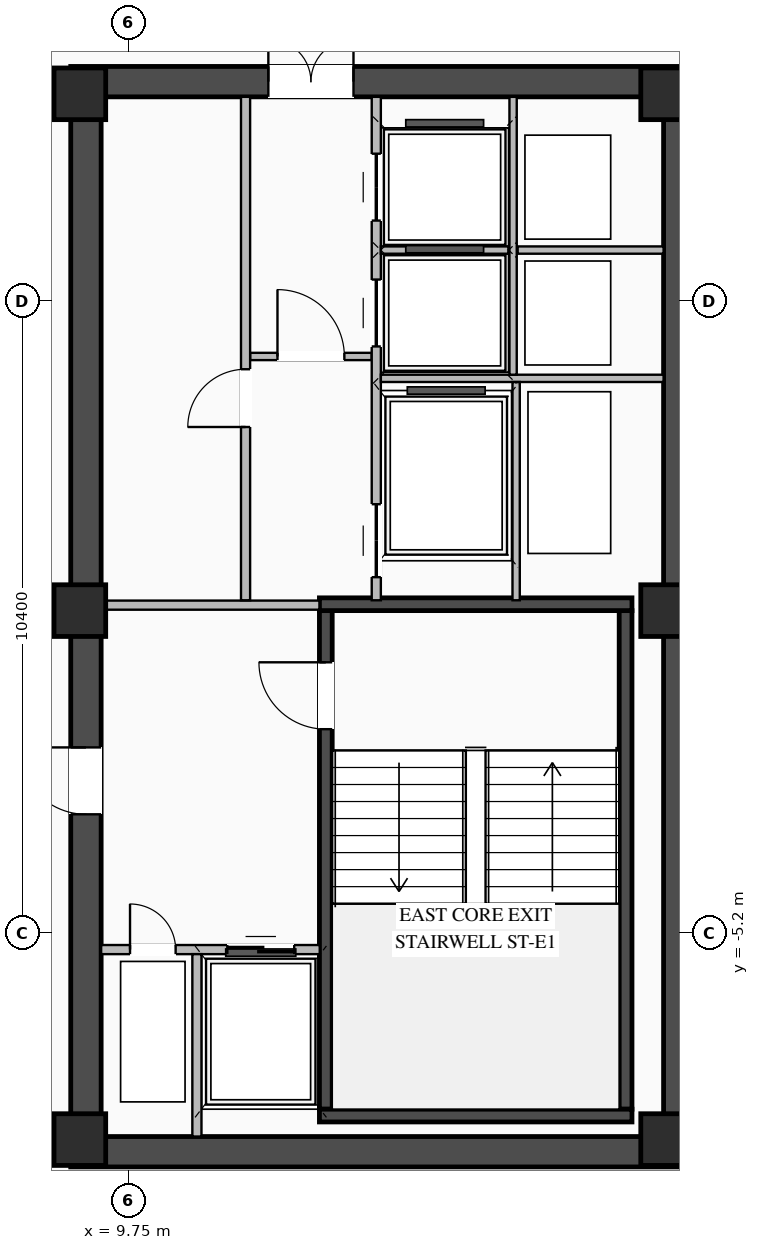
"""IFC4 building model, lengths in metres.
Left out: names, types, materials, properties, quantities, classifications, styles, units other than length and angle.
Written with IfcOpenShell. Run it as: python <this file> out.ifc"""

import sys

from ifc_helpers import new_model, si_unit, direction, frame, frame_2d, origin, origin_2d, place, context, subcontext, project, spatial, rectangle, extrude, element, fill, save


model = new_model("IFC4")
c1 = context("Model", 3, precision=1e-05, world=origin(), true_north=direction((0.0, 1.0)))
c2 = subcontext(c1, "Body", "Model", "MODEL_VIEW")
j1 = project(units=[si_unit("LENGTHUNIT", "METRE"), si_unit("PLANEANGLEUNIT", "RADIAN")], contexts=[c1])
p1 = place(None, origin())
s1 = spatial("IfcSite", under=j1, at=p1, CompositionType="ELEMENT")
p2 = place(p1, origin())
s2 = spatial("IfcBuilding", under=s1, at=p2, CompositionType="ELEMENT")
p3 = place(p2, frame((0.0, 0.0, 236.1)))
s3 = spatial("IfcBuildingStorey", under=s2, at=p3, CompositionType="ELEMENT", Elevation=236.1)
p4 = place(p3, frame((8.8, -8.8, 0.0), z_axis=(0.0, 0.0, 1.0), x_axis=(1.0, 0.0, 0.0)))
e1 = element("IfcWall", 1, at=p4, inside=s3, PredefinedType="SHEAR", context=c2, shape_type="SweptSolid", body=[
    extrude(rectangle(XDim=10.25, YDim=0.5, at=frame_2d((5.125, 0.0))), origin(), (0.0, 0.0, 1.0), 3.27),
])
p5 = place(p3, frame((8.8, 8.8, 0.0), z_axis=(0.0, 0.0, 1.0), x_axis=(1.0, 0.0, 0.0)))
e2 = element("IfcWall", 2, at=p5, inside=s3, PredefinedType="SHEAR", context=c2, shape_type="SweptSolid", body=[
    extrude(rectangle(XDim=10.25, YDim=0.5, at=frame_2d((5.125, 0.0))), origin(), (0.0, 0.0, 1.0), 3.27),
])
p6 = place(p5, frame((3.25, 0.0, 0.0)))
e3 = element("IfcOpeningElement", 3, at=p6, cuts=e2, PredefinedType="OPENING", context=c2, shape_type="SweptSolid", body=[
    extrude(rectangle(XDim=1.4, YDim=2.05, at=frame_2d((0.7, 1.025))), frame((0.0, 0.26, 0.0), z_axis=(0.0, -1.0, 0.0), x_axis=(1.0, 0.0, 0.0)), (0.0, 0.0, 1.0), 0.52),
])
p7 = place(p3, frame((9.05, -8.55, 0.0), z_axis=(0.0, 0.0, 1.0), x_axis=(0.0, 1.0, 0.0)))
e4 = element("IfcWall", 4, at=p7, inside=s3, PredefinedType="SHEAR", context=c2, shape_type="SweptSolid", body=[
    extrude(rectangle(XDim=17.1, YDim=0.5, at=frame_2d((8.55, 0.0))), origin(), (0.0, 0.0, 1.0), 3.27),
])
p8 = place(p7, frame((5.3, 0.0, 0.0)))
e5 = element("IfcOpeningElement", 5, at=p8, cuts=e4, PredefinedType="OPENING", context=c2, shape_type="SweptSolid", body=[
    extrude(rectangle(XDim=1.1, YDim=2.08, at=frame_2d((0.55, 1.04))), frame((0.0, 0.26, 0.0), z_axis=(0.0, -1.0, 0.0), x_axis=(1.0, 0.0, 0.0)), (0.0, 0.0, 1.0), 0.52),
])
p9 = place(p3, frame((18.8, -8.55, 0.0), z_axis=(0.0, 0.0, 1.0), x_axis=(0.0, 1.0, 0.0)))
e6 = element("IfcWall", 6, at=p9, inside=s3, PredefinedType="SHEAR", context=c2, shape_type="SweptSolid", body=[
    extrude(rectangle(XDim=17.1, YDim=0.5, at=frame_2d((8.55, 0.0))), origin(), (0.0, 0.0, 1.0), 3.27),
])
p10 = place(p3, frame((12.995, -8.1, 0.0), z_axis=(0.0, 0.0, 1.0), x_axis=(0.0, 1.0, 0.0)))
e7 = element("IfcWall", 7, at=p10, inside=s3, PredefinedType="SHEAR", context=c2, shape_type="SweptSolid", body=[
    extrude(rectangle(XDim=8.2, YDim=0.21, at=frame_2d((4.1, 0.0))), origin(), (0.0, 0.0, 1.0), 3.27),
])
p11 = place(p10, frame((6.25, 0.0, 0.0)))
e8 = element("IfcOpeningElement", 8, at=p11, cuts=e7, PredefinedType="OPENING", context=c2, shape_type="SweptSolid", body=[
    extrude(rectangle(XDim=1.1, YDim=2.15, at=frame_2d((0.55, 1.075))), frame((0.0, 0.115, 0.0), z_axis=(0.0, -1.0, 0.0), x_axis=(1.0, 0.0, 0.0)), (0.0, 0.0, 1.0), 0.23),
])
p12 = place(p3, frame((17.925, -8.1, 0.0), z_axis=(0.0, 0.0, 1.0), x_axis=(0.0, 1.0, 0.0)))
e9 = element("IfcWall", 9, at=p12, inside=s3, PredefinedType="SHEAR", context=c2, shape_type="SweptSolid", body=[
    extrude(rectangle(XDim=8.2, YDim=0.21, at=frame_2d((4.1, 0.0))), origin(), (0.0, 0.0, 1.0), 3.27),
])
for number, where, z_axis, x_axis in (
    (10, (12.89, -8.205, 0.0), (0.0, 0.0, 1.0), (1.0, 0.0, 0.0)),
    (11, (18.03, 0.205, 0.0), (0.0, 0.0, 1.0), (-1.0, 0.0, 0.0)),
):
    element("IfcWall", number, at=place(p3, frame(where, z_axis=z_axis, x_axis=x_axis)), inside=s3, PredefinedType="SHEAR", context=c2, shape_type="SweptSolid", body=[
        extrude(rectangle(XDim=5.14, YDim=0.21, at=frame_2d((2.57, 0.0))), origin(), (0.0, 0.0, 1.0), 3.27),
    ])
for number, where, z_axis, x_axis in (
    (12, (8.95, -8.6, 0.0), (0.0, 0.0, 1.0), (1.0, 0.0, 0.0)),
    (13, (8.95, 0.1, 0.0), (0.0, 0.0, 1.0), (1.0, 0.0, 0.0)),
    (14, (8.95, 8.6, 0.0), (0.0, 0.0, 1.0), (1.0, 0.0, 0.0)),
    (15, (18.6, -8.6, 0.0), (0.0, 0.0, 1.0), (1.0, 0.0, 0.0)),
    (16, (18.6, 0.1, 0.0), (0.0, 0.0, 1.0), (1.0, 0.0, 0.0)),
    (17, (18.6, 8.6, 0.0), (0.0, 0.0, 1.0), (1.0, 0.0, 0.0)),
):
    element("IfcColumn", number, at=place(p3, frame(where, z_axis=z_axis, x_axis=x_axis)), inside=s3, PredefinedType="COLUMN", context=c2, shape_type="SweptSolid", body=[
        extrude(rectangle(XDim=0.85, YDim=0.85, at=origin_2d()), origin(), (0.0, 0.0, 1.0), 3.45),
    ])
p13 = place(p3, frame((9.3, -5.475, 0.0), z_axis=(0.0, 0.0, 1.0), x_axis=(1.0, 0.0, 0.0)))
e18 = element("IfcWall", 18, at=p13, inside=s3, PredefinedType="STANDARD", context=c2, shape_type="SweptSolid", body=[
    extrude(rectangle(XDim=3.595, YDim=0.15, at=frame_2d((1.797, 0.0))), origin(), (0.0, 0.0, 1.0), 3.25),
])
p14 = place(p13, frame((2.075, 0.0, 0.0)))
e19 = element("IfcOpeningElement", 19, at=p14, cuts=e18, PredefinedType="OPENING", context=c2, shape_type="SweptSolid", body=[
    extrude(rectangle(XDim=1.1, YDim=2.15, at=frame_2d((0.55, 1.075))), frame((0.0, 0.085, 0.0), z_axis=(0.0, -1.0, 0.0), x_axis=(1.0, 0.0, 0.0)), (0.0, 0.0, 1.0), 0.17),
])
p15 = place(p13, frame((0.475, 0.0, 0.0)))
e20 = element("IfcOpeningElement", 20, at=p15, cuts=e18, PredefinedType="OPENING", context=c2, shape_type="SweptSolid", body=[
    extrude(rectangle(XDim=0.75, YDim=2.05, at=frame_2d((0.375, 1.025))), frame((0.0, 0.085, 0.0), z_axis=(0.0, -1.0, 0.0), x_axis=(1.0, 0.0, 0.0)), (0.0, 0.0, 1.0), 0.17),
])
p16 = place(p3, frame((10.875, -8.55, 0.0), z_axis=(0.0, 0.0, 1.0), x_axis=(0.0, 1.0, 0.0)))
e21 = element("IfcWall", 21, at=p16, inside=s3, PredefinedType="STANDARD", context=c2, shape_type="SweptSolid", body=[
    extrude(rectangle(XDim=3.0, YDim=0.15, at=frame_2d((1.5, 0.0))), origin(), (0.0, 0.0, 1.0), 3.25),
])
p17 = place(p3, frame((9.3, 0.19, 0.0), z_axis=(0.0, 0.0, 1.0), x_axis=(1.0, 0.0, 0.0)))
e22 = element("IfcWall", 22, at=p17, inside=s3, PredefinedType="STANDARD", context=c2, shape_type="SweptSolid", body=[
    extrude(rectangle(XDim=3.59, YDim=0.15, at=frame_2d((1.795, 0.0))), origin(), (0.0, 0.0, 1.0), 2.645),
])
p18 = place(p3, frame((11.75, 4.28, 0.0), z_axis=(0.0, 0.0, 1.0), x_axis=(1.0, 0.0, 0.0)))
e23 = element("IfcWall", 23, at=p18, inside=s3, PredefinedType="STANDARD", context=c2, shape_type="SweptSolid", body=[
    extrude(rectangle(XDim=2.0, YDim=0.12, at=frame_2d((1.0, 0.0))), origin(), (0.0, 0.0, 1.0), 3.25),
])
p19 = place(p18, frame((0.45, 0.0, 0.0)))
e24 = element("IfcOpeningElement", 24, at=p19, cuts=e23, PredefinedType="OPENING", context=c2, shape_type="SweptSolid", body=[
    extrude(rectangle(XDim=1.1, YDim=2.1, at=frame_2d((0.55, 1.05))), frame((0.0, 0.07, 0.0), z_axis=(0.0, -1.0, 0.0), x_axis=(1.0, 0.0, 0.0)), (0.0, 0.0, 1.0), 0.14),
])
p20 = place(p3, frame((11.675, 0.27, 0.0), z_axis=(0.0, 0.0, 1.0), x_axis=(0.0, 1.0, 0.0)))
e25 = element("IfcWall", 25, at=p20, inside=s3, PredefinedType="STANDARD", context=c2, shape_type="SweptSolid", body=[
    extrude(rectangle(XDim=8.28, YDim=0.15, at=frame_2d((4.14, 0.0))), origin(), (0.0, 0.0, 1.0), 3.25),
])
p21 = place(p20, frame((2.85, 0.0, 0.0)))
e26 = element("IfcOpeningElement", 26, at=p21, cuts=e25, PredefinedType="OPENING", context=c2, shape_type="SweptSolid", body=[
    extrude(rectangle(XDim=0.95, YDim=2.05, at=frame_2d((0.475, 1.025))), frame((0.0, 0.085, 0.0), z_axis=(0.0, -1.0, 0.0), x_axis=(1.0, 0.0, 0.0)), (0.0, 0.0, 1.0), 0.17),
])
p22 = place(p3, frame((13.825, 0.27, 0.0), z_axis=(0.0, 0.0, 1.0), x_axis=(0.0, 1.0, 0.0)))
e27 = element("IfcWall", 27, at=p22, inside=s3, PredefinedType="STANDARD", context=c2, shape_type="SweptSolid", body=[
    extrude(rectangle(XDim=8.28, YDim=0.15, at=frame_2d((4.14, 0.0))), origin(), (0.0, 0.0, 1.0), 3.25),
])
p23 = place(p22, frame((4.175, 0.0, 0.0)))
e28 = element("IfcOpeningElement", 28, at=p23, cuts=e27, PredefinedType="OPENING", context=c2, shape_type="SweptSolid", body=[
    extrude(rectangle(XDim=1.1, YDim=2.1, at=frame_2d((0.55, 1.05))), frame((0.0, 0.085, 0.0), z_axis=(0.0, -1.0, 0.0), x_axis=(1.0, 0.0, 0.0)), (0.0, 0.0, 1.0), 0.17),
])
p24 = place(p22, frame((6.245, 0.0, 0.0)))
e29 = element("IfcOpeningElement", 29, at=p24, cuts=e27, PredefinedType="OPENING", context=c2, shape_type="SweptSolid", body=[
    extrude(rectangle(XDim=1.1, YDim=2.1, at=frame_2d((0.55, 1.05))), frame((0.0, 0.085, 0.0), z_axis=(0.0, -1.0, 0.0), x_axis=(1.0, 0.0, 0.0)), (0.0, 0.0, 1.0), 0.17),
])
p25 = place(p22, frame((0.38, 0.0, 0.0)))
e30 = element("IfcOpeningElement", 30, at=p25, cuts=e27, PredefinedType="OPENING", context=c2, shape_type="SweptSolid", body=[
    extrude(rectangle(XDim=1.2, YDim=2.1, at=frame_2d((0.6, 1.05))), frame((0.0, 0.085, 0.0), z_axis=(0.0, -1.0, 0.0), x_axis=(1.0, 0.0, 0.0)), (0.0, 0.0, 1.0), 0.17),
])
p26 = place(p3, frame((13.9, 3.92, 0.0), z_axis=(0.0, 0.0, 1.0), x_axis=(1.0, 0.0, 0.0)))
e31 = element("IfcWall", 31, at=p26, inside=s3, PredefinedType="STANDARD", context=c2, shape_type="SweptSolid", body=[
    extrude(rectangle(XDim=4.65, YDim=0.12, at=frame_2d((2.325, 0.0))), origin(), (0.0, 0.0, 1.0), 3.25),
])
p27 = place(p3, frame((16.15, 6.03, 0.0), z_axis=(0.0, 0.0, 1.0), x_axis=(1.0, 0.0, 0.0)))
e32 = element("IfcWall", 32, at=p27, inside=s3, PredefinedType="STANDARD", context=c2, shape_type="SweptSolid", body=[
    extrude(rectangle(XDim=2.4, YDim=0.12, at=frame_2d((1.2, 0.0))), origin(), (0.0, 0.0, 1.0), 3.25),
])
p28 = place(p3, frame((16.075, 3.98, 0.0), z_axis=(0.0, 0.0, 1.0), x_axis=(0.0, 1.0, 0.0)))
e33 = element("IfcWall", 33, at=p28, inside=s3, PredefinedType="STANDARD", context=c2, shape_type="SweptSolid", body=[
    extrude(rectangle(XDim=4.57, YDim=0.12, at=frame_2d((2.285, 0.0))), origin(), (0.0, 0.0, 1.0), 3.25),
])
p29 = place(p3, frame((13.9, 6.03, 0.0), z_axis=(0.0, 0.0, 1.0), x_axis=(1.0, 0.0, 0.0)))
e34 = element("IfcWall", 34, at=p29, inside=s3, PredefinedType="STANDARD", context=c2, shape_type="SweptSolid", body=[
    extrude(rectangle(XDim=2.1, YDim=0.12, at=frame_2d((1.05, 0.0))), origin(), (0.0, 0.0, 1.0), 3.25),
])
p30 = place(p3, frame((16.125, 0.27, 0.0), z_axis=(0.0, 0.0, 1.0), x_axis=(0.0, 1.0, 0.0)))
e35 = element("IfcWall", 35, at=p30, inside=s3, PredefinedType="STANDARD", context=c2, shape_type="SweptSolid", body=[
    extrude(rectangle(XDim=3.59, YDim=0.12, at=frame_2d((1.795, 0.0))), origin(), (0.0, 0.0, 1.0), 3.25),
])
p31 = place(p11, origin())
e36 = element("IfcDoor", 36, at=p31, inside=s3, OperationType="SINGLE_SWING_RIGHT", PredefinedType="DOOR", context=c2, shape_type="SweptSolid", body=[
    extrude(rectangle(XDim=1.1, YDim=2.15, at=frame_2d((0.55, 1.075))), frame((0.0, 0.025, 0.0), z_axis=(0.0, -1.0, 0.0), x_axis=(1.0, 0.0, 0.0)), (0.0, 0.0, 1.0), 0.05),
])
fill(e8, e36)
p32 = place(p14, origin())
e37 = element("IfcDoor", 37, at=p32, inside=s3, OperationType="DOUBLE_DOOR_SLIDING", PredefinedType="DOOR", context=c2, shape_type="SweptSolid", body=[
    extrude(rectangle(XDim=1.1, YDim=2.15, at=frame_2d((0.55, 1.075))), frame((0.0, 0.025, 0.0), z_axis=(0.0, -1.0, 0.0), x_axis=(1.0, 0.0, 0.0)), (0.0, 0.0, 1.0), 0.05),
])
fill(e19, e37)
p33 = place(p15, origin())
e38 = element("IfcDoor", 38, at=p33, inside=s3, OperationType="SINGLE_SWING_LEFT", PredefinedType="DOOR", context=c2, shape_type="SweptSolid", body=[
    extrude(rectangle(XDim=0.75, YDim=2.05, at=frame_2d((0.375, 1.025))), frame((0.0, 0.025, 0.0), z_axis=(0.0, -1.0, 0.0), x_axis=(1.0, 0.0, 0.0)), (0.0, 0.0, 1.0), 0.05),
])
fill(e20, e38)
p34 = place(p8, origin())
e39 = element("IfcDoor", 39, at=p34, inside=s3, OperationType="SINGLE_SWING_RIGHT", PredefinedType="DOOR", context=c2, shape_type="SweptSolid", body=[
    extrude(rectangle(XDim=1.1, YDim=2.08, at=frame_2d((0.55, 1.04))), frame((0.0, -0.155, 0.0), z_axis=(0.0, -1.0, 0.0), x_axis=(1.0, 0.0, 0.0)), (0.0, 0.0, 1.0), 0.05),
])
fill(e5, e39)
p35 = place(p19, origin())
e40 = element("IfcDoor", 40, at=p35, inside=s3, OperationType="SINGLE_SWING_LEFT", PredefinedType="DOOR", context=c2, shape_type="SweptSolid", body=[
    extrude(rectangle(XDim=1.1, YDim=2.1, at=frame_2d((0.55, 1.05))), frame((0.0, 0.025, 0.0), z_axis=(0.0, -1.0, 0.0), x_axis=(1.0, 0.0, 0.0)), (0.0, 0.0, 1.0), 0.05),
])
fill(e24, e40)
p36 = place(p6, origin())
e41 = element("IfcDoor", 41, at=p36, inside=s3, OperationType="DOUBLE_DOOR_SINGLE_SWING", PredefinedType="DOOR", context=c2, shape_type="SweptSolid", body=[
    extrude(rectangle(XDim=1.4, YDim=2.05, at=frame_2d((0.7, 1.025))), frame((0.0, 0.195, 0.0), z_axis=(0.0, -1.0, 0.0), x_axis=(1.0, 0.0, 0.0)), (0.0, 0.0, 1.0), 0.05),
])
fill(e3, e41)
p37 = place(p21, origin())
e42 = element("IfcDoor", 42, at=p37, inside=s3, OperationType="SINGLE_SWING_LEFT", PredefinedType="DOOR", context=c2, shape_type="SweptSolid", body=[
    extrude(rectangle(XDim=0.95, YDim=2.05, at=frame_2d((0.475, 1.025))), frame((0.0, 0.025, 0.0), z_axis=(0.0, -1.0, 0.0), x_axis=(1.0, 0.0, 0.0)), (0.0, 0.0, 1.0), 0.05),
])
fill(e26, e42)
p38 = place(p23, origin())
e43 = element("IfcDoor", 43, at=p38, inside=s3, OperationType="DOUBLE_DOOR_SLIDING", PredefinedType="DOOR", context=c2, shape_type="SweptSolid", body=[
    extrude(rectangle(XDim=1.1, YDim=2.1, at=frame_2d((0.55, 1.05))), frame((0.0, 0.025, 0.0), z_axis=(0.0, -1.0, 0.0), x_axis=(1.0, 0.0, 0.0)), (0.0, 0.0, 1.0), 0.05),
])
fill(e28, e43)
p39 = place(p24, origin())
e44 = element("IfcDoor", 44, at=p39, inside=s3, OperationType="DOUBLE_DOOR_SLIDING", PredefinedType="DOOR", context=c2, shape_type="SweptSolid", body=[
    extrude(rectangle(XDim=1.1, YDim=2.1, at=frame_2d((0.55, 1.05))), frame((0.0, 0.025, 0.0), z_axis=(0.0, -1.0, 0.0), x_axis=(1.0, 0.0, 0.0)), (0.0, 0.0, 1.0), 0.05),
])
fill(e29, e44)
p40 = place(p25, origin())
e45 = element("IfcDoor", 45, at=p40, inside=s3, OperationType="DOUBLE_DOOR_SLIDING", PredefinedType="DOOR", context=c2, shape_type="SweptSolid", body=[
    extrude(rectangle(XDim=1.2, YDim=2.1, at=frame_2d((0.6, 1.05))), frame((0.0, 0.025, 0.0), z_axis=(0.0, -1.0, 0.0), x_axis=(1.0, 0.0, 0.0)), (0.0, 0.0, 1.0), 0.05),
])
fill(e30, e45)
save(model, sys.argv[1])
